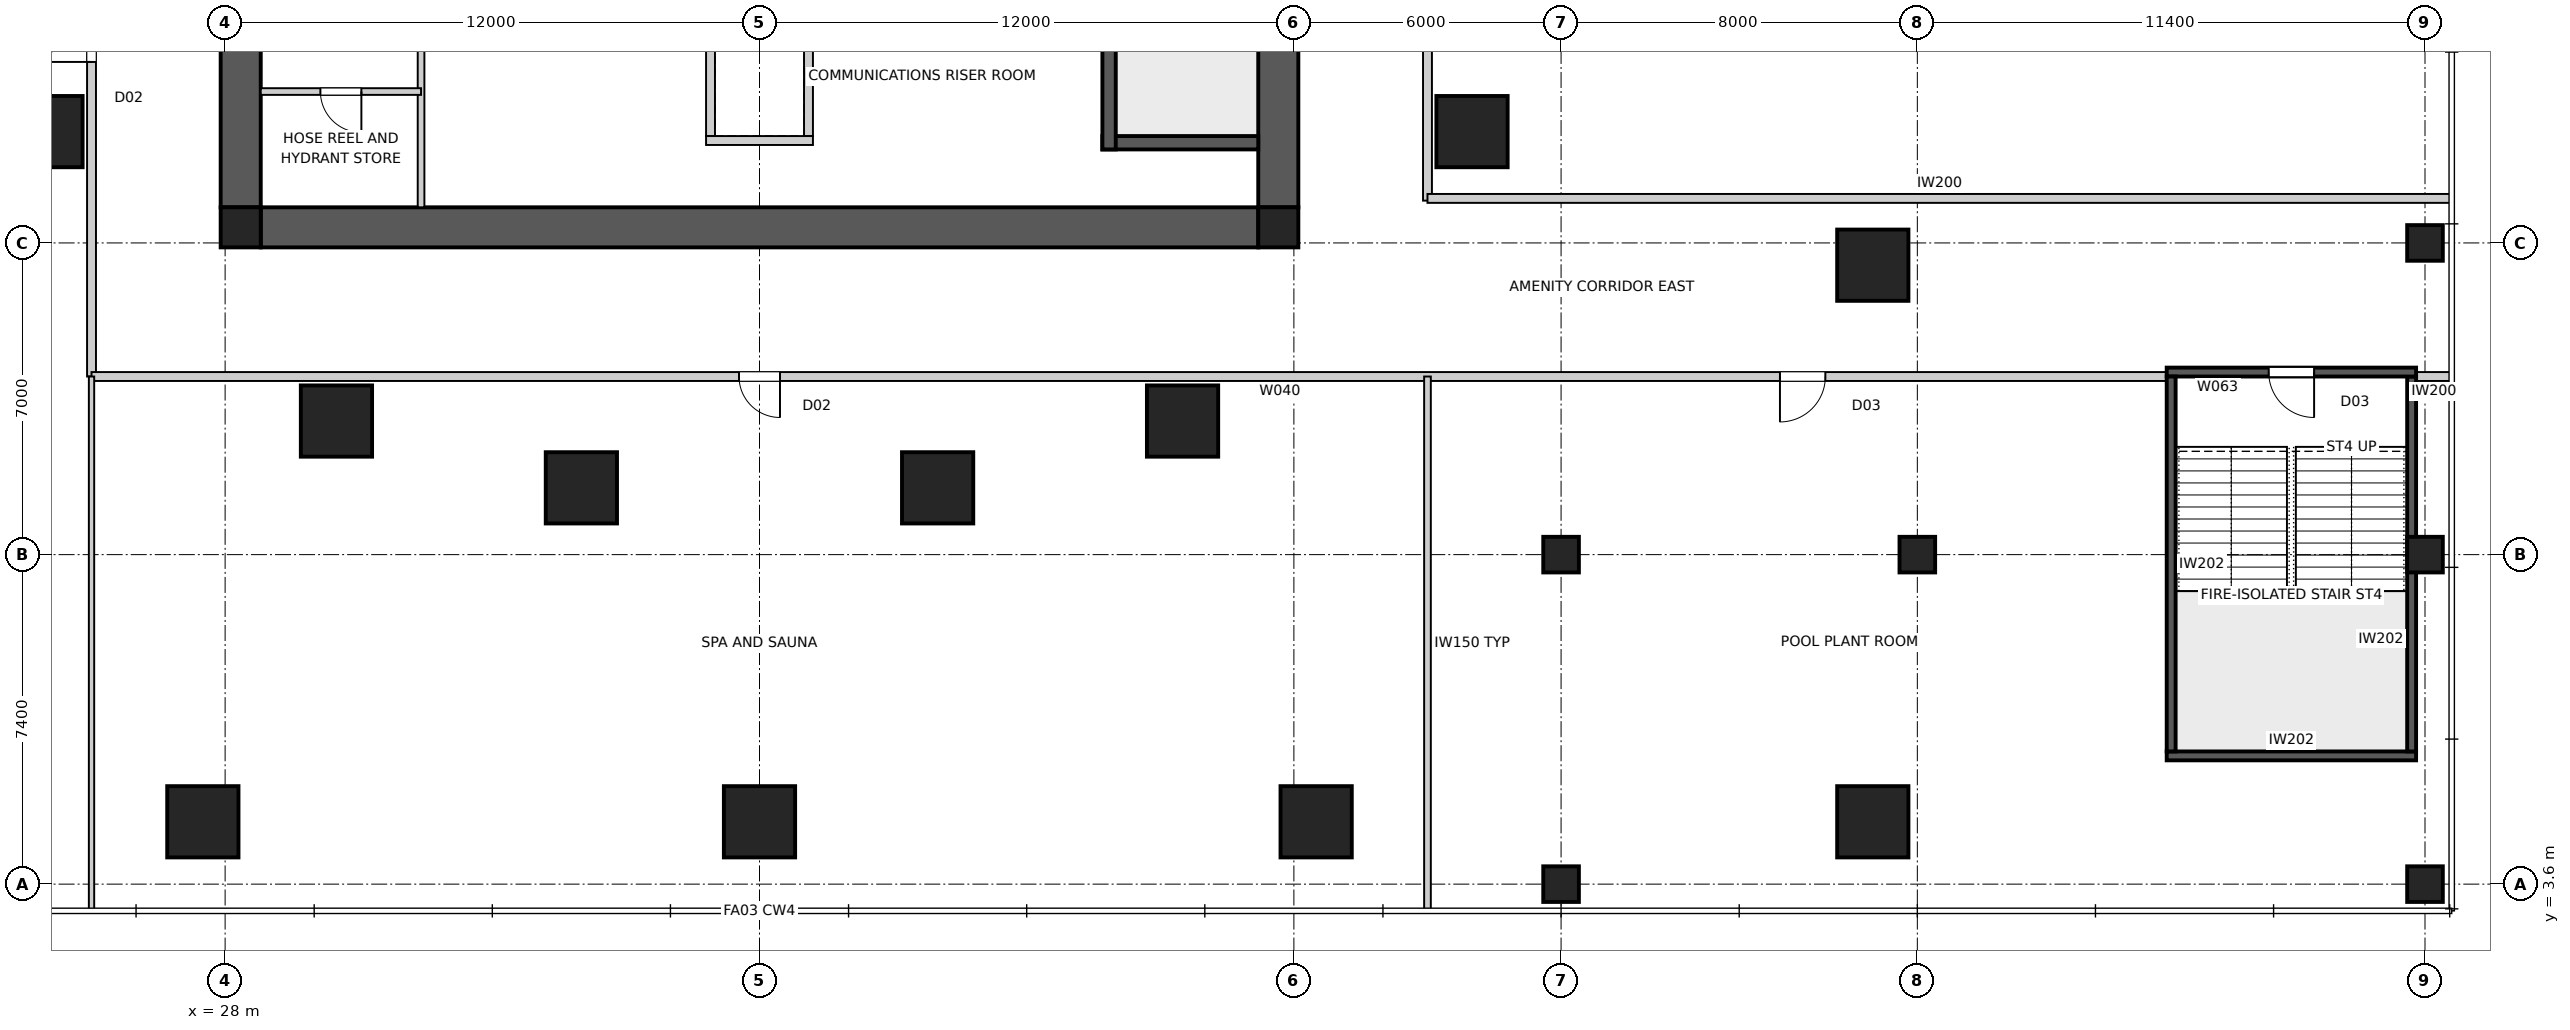
"""IFC4 building model, lengths in metres.
Left out: names, types, materials, properties, quantities, classifications, styles, units other than length and angle.
Written with IfcOpenShell. Run it as: python <this file> out.ifc"""

import sys

from ifc_helpers import new_model, si_unit, direction, frame, frame_2d, origin, origin_2d, place, context, subcontext, project, spatial, polyline, rectangle, outline, extrude, element, fill, save


model = new_model("IFC4")
c1 = context("Model", 3, precision=1e-05, world=origin(), true_north=direction((0.0, 1.0)))
c2 = subcontext(c1, "Body", "Model", "MODEL_VIEW")
j1 = project(units=[si_unit("LENGTHUNIT", "METRE"), si_unit("PLANEANGLEUNIT", "RADIAN")], contexts=[c1])
p1 = place(None, origin())
s1 = spatial("IfcSite", under=j1, at=p1, CompositionType="ELEMENT")
p2 = place(p1, origin())
s2 = spatial("IfcBuilding", under=s1, at=p2, CompositionType="ELEMENT")
p3 = place(p2, frame((0.0, 0.0, 6.0)))
s3 = spatial("IfcBuildingStorey", under=s2, at=p3, CompositionType="ELEMENT", Elevation=6.0)
p4 = place(p3, frame((51.2, 18.35, 0.0), z_axis=(0.0, 0.0, 1.0), x_axis=(-1.0, 0.0, 0.0)))
e1 = element("IfcWall", 1, at=p4, inside=s3, PredefinedType="SHEAR", context=c2, shape_type="SweptSolid", body=[
    extrude(outline(polyline([(0.0, -0.45), (22.4, -0.45), (22.4, -0.025), (22.85, -0.025), (22.85, 0.025), (22.4, 0.025), (22.4, 0.45), (0.0, 0.45), (0.0, 0.025), (-0.45, 0.025), (-0.45, -0.025), (0.0, -0.025), (0.0, -0.45)])), origin(), (0.0, 0.0, 1.0), 4.5),
])
p5 = place(p3, frame((51.65, 18.8, 0.0), z_axis=(0.0, 0.0, 1.0), x_axis=(0.0, 1.0, 0.0)))
e2 = element("IfcWall", 2, at=p5, inside=s3, PredefinedType="SHEAR", context=c2, shape_type="SweptSolid", body=[
    extrude(outline(polyline([(0.0, -0.45), (22.4, -0.45), (22.4, -0.025), (22.85, -0.025), (22.85, 0.025), (22.4, 0.025), (22.4, 0.45), (0.0, 0.45), (0.0, 0.025), (-0.45, 0.025), (-0.45, -0.025), (0.0, -0.025), (0.0, -0.45)])), origin(), (0.0, 0.0, 1.0), 4.5),
])
p6 = place(p5, frame((11.14, 0.0, 0.0)))
e3 = element("IfcOpeningElement", 3, at=p6, cuts=e2, PredefinedType="OPENING", context=c2, shape_type="SweptSolid", body=[
    extrude(rectangle(XDim=1.02, YDim=2.4, at=frame_2d((0.51, 1.2))), frame((0.0, 0.46, 0.0), z_axis=(0.0, -1.0, 0.0), x_axis=(1.0, 0.0, 0.0)), (0.0, 0.0, 1.0), 0.92),
])
p7 = place(p3, frame((28.35, 41.2, 0.0), z_axis=(0.0, 0.0, 1.0), x_axis=(0.0, -1.0, 0.0)))
e4 = element("IfcWall", 4, at=p7, inside=s3, PredefinedType="SHEAR", context=c2, shape_type="SweptSolid", body=[
    extrude(outline(polyline([(0.0, -0.45), (22.4, -0.45), (22.4, -0.025), (22.85, -0.025), (22.85, 0.025), (22.4, 0.025), (22.4, 0.45), (0.0, 0.45), (0.0, 0.025), (-0.45, 0.025), (-0.45, -0.025), (0.0, -0.025), (0.0, -0.45)])), origin(), (0.0, 0.0, 1.0), 4.5),
])
p8 = place(p7, frame((11.14, 0.0, 0.0)))
e5 = element("IfcOpeningElement", 5, at=p8, cuts=e4, PredefinedType="OPENING", context=c2, shape_type="SweptSolid", body=[
    extrude(rectangle(XDim=1.02, YDim=2.4, at=frame_2d((0.51, 1.2))), frame((0.0, 0.46, 0.0), z_axis=(0.0, -1.0, 0.0), x_axis=(1.0, 0.0, 0.0)), (0.0, 0.0, 1.0), 0.92),
])
p9 = place(p3, frame((47.85, 27.8, 0.0), z_axis=(0.0, 0.0, 1.0), x_axis=(0.0, -1.0, 0.0)))
e6 = element("IfcWall", 6, at=p9, inside=s3, PredefinedType="SHEAR", context=c2, shape_type="SweptSolid", body=[
    extrude(rectangle(XDim=7.7, YDim=0.3, at=frame_2d((3.85, 0.0))), origin(), (0.0, 0.0, 1.0), 4.5),
])
p10 = place(p3, frame((51.2, 20.25, 0.0), z_axis=(0.0, 0.0, 1.0), x_axis=(-1.0, 0.0, 0.0)))
e7 = element("IfcWall", 7, at=p10, inside=s3, PredefinedType="SHEAR", context=c2, shape_type="SweptSolid", body=[
    extrude(rectangle(XDim=3.5, YDim=0.3, at=frame_2d((1.75, 0.0))), origin(), (0.0, 0.0, 1.0), 4.5),
])
for number, where, z_axis, x_axis in (
    (8, (38.9, 22.4, 0.0), (0.0, 0.0, 1.0), (0.0, -1.0, 0.0)),
    (9, (41.1, 22.4, 0.0), (0.0, 0.0, 1.0), (0.0, -1.0, 0.0)),
):
    element("IfcWall", number, at=place(p3, frame(where, z_axis=z_axis, x_axis=x_axis)), inside=s3, PredefinedType="SOLIDWALL", context=c2, shape_type="SweptSolid", body=[
        extrude(rectangle(XDim=2.0, YDim=0.2, at=frame_2d((1.0, 0.0))), origin(), (0.0, 0.0, 1.0), 4.5),
    ])
p11 = place(p3, frame((38.8, 20.3, 0.0), z_axis=(0.0, 0.0, 1.0), x_axis=(1.0, 0.0, 0.0)))
e10 = element("IfcWall", 10, at=p11, inside=s3, PredefinedType="SOLIDWALL", context=c2, shape_type="SweptSolid", body=[
    extrude(rectangle(XDim=2.4, YDim=0.2, at=frame_2d((1.2, 0.0))), origin(), (0.0, 0.0, 1.0), 4.5),
])
for number, where, z_axis, x_axis in (
    (11, (28.35, 18.35, 0.0), (0.0, 0.0, 1.0), (1.0, 0.0, 0.0)),
    (12, (51.65, 18.35, 0.0), (0.0, 0.0, 1.0), (1.0, 0.0, 0.0)),
):
    element("IfcColumn", number, at=place(p3, frame(where, z_axis=z_axis, x_axis=x_axis)), inside=s3, PredefinedType="COLUMN", context=c2, shape_type="SweptSolid", body=[
        extrude(rectangle(XDim=0.9, YDim=0.9, at=origin_2d()), origin(), (0.0, 0.0, 1.0), 4.5),
    ])
for number, where, z_axis, x_axis in (
    (13, (27.5, 5.0, 0.0), (0.0, 0.0, 1.0), (1.0, 0.0, 0.0)),
    (14, (40.0, 5.0, 0.0), (0.0, 0.0, 1.0), (1.0, 0.0, 0.0)),
    (15, (52.5, 5.0, 0.0), (0.0, 0.0, 1.0), (1.0, 0.0, 0.0)),
    (16, (65.0, 5.0, 0.0), (0.0, 0.0, 1.0), (1.0, 0.0, 0.0)),
    (17, (65.0, 17.5, 0.0), (0.0, 0.0, 1.0), (1.0, 0.0, 0.0)),
):
    element("IfcColumn", number, at=place(p3, frame(where, z_axis=z_axis, x_axis=x_axis)), inside=s3, PredefinedType="COLUMN", context=c2, shape_type="SweptSolid", body=[
        extrude(rectangle(XDim=1.6, YDim=1.6, at=origin_2d()), origin(), (0.0, 0.0, 1.0), 4.5),
    ])
for number, where, z_axis, x_axis in (
    (18, (58.0, 3.6, 0.0), (0.0, 0.0, 1.0), (1.0, 0.0, 0.0)),
    (19, (58.0, 11.0, 0.0), (0.0, 0.0, 1.0), (1.0, 0.0, 0.0)),
    (20, (66.0, 11.0, 0.0), (0.0, 0.0, 1.0), (1.0, 0.0, 0.0)),
    (21, (77.4, 3.6, 0.0), (0.0, 0.0, 1.0), (1.0, 0.0, 0.0)),
    (22, (77.4, 11.0, 0.0), (0.0, 0.0, 1.0), (1.0, 0.0, 0.0)),
    (23, (77.4, 18.0, 0.0), (0.0, 0.0, 1.0), (1.0, 0.0, 0.0)),
):
    element("IfcColumn", number, at=place(p3, frame(where, z_axis=z_axis, x_axis=x_axis)), inside=s3, PredefinedType="COLUMN", context=c2, shape_type="SweptSolid", body=[
        extrude(rectangle(XDim=0.8, YDim=0.8, at=origin_2d()), origin(), (0.0, 0.0, 1.0), 4.5),
    ])
for number, where, z_axis, x_axis in (
    (24, (24.0, 20.5, 0.0), (0.0, 0.0, 1.0), (1.0, 0.0, 0.0)),
    (25, (30.5, 14.0, 0.0), (0.0, 0.0, 1.0), (1.0, 0.0, 0.0)),
    (26, (36.0, 12.5, 0.0), (0.0, 0.0, 1.0), (1.0, 0.0, 0.0)),
    (27, (44.0, 12.5, 0.0), (0.0, 0.0, 1.0), (1.0, 0.0, 0.0)),
    (28, (49.5, 14.0, 0.0), (0.0, 0.0, 1.0), (1.0, 0.0, 0.0)),
    (29, (56.0, 20.5, 0.0), (0.0, 0.0, 1.0), (1.0, 0.0, 0.0)),
):
    element("IfcColumn", number, at=place(p3, frame(where, z_axis=z_axis, x_axis=x_axis)), inside=s3, PredefinedType="COLUMN", context=c2, shape_type="SweptSolid", body=[
        extrude(rectangle(XDim=1.6, YDim=1.6, at=origin_2d()), origin(), (0.0, 0.0, 1.0), 4.5),
    ])
p12 = place(p3, frame((71.6, 6.48, 0.0), z_axis=(0.0, 0.0, 1.0), x_axis=(1.0, 0.0, 0.0)))
e30 = element("IfcWall", 30, at=p12, inside=s3, PredefinedType="SOLIDWALL", context=c2, shape_type="SweptSolid", body=[
    extrude(rectangle(XDim=5.6, YDim=0.2, at=frame_2d((2.8, 0.0))), origin(), (0.0, 0.0, 1.0), 4.15),
])
p13 = place(p3, frame((77.1, 6.58, 0.0), z_axis=(0.0, 0.0, 1.0), x_axis=(0.0, 1.0, 0.0)))
e31 = element("IfcWall", 31, at=p13, inside=s3, PredefinedType="SOLIDWALL", context=c2, shape_type="SweptSolid", body=[
    extrude(rectangle(XDim=8.42, YDim=0.2, at=frame_2d((4.21, 0.0))), origin(), (0.0, 0.0, 1.0), 4.15),
])
p14 = place(p3, frame((77.2, 15.1, 0.0), z_axis=(0.0, 0.0, 1.0), x_axis=(-1.0, 0.0, 0.0)))
e32 = element("IfcWall", 32, at=p14, inside=s3, PredefinedType="SOLIDWALL", context=c2, shape_type="SweptSolid", body=[
    extrude(rectangle(XDim=5.6, YDim=0.2, at=frame_2d((2.8, 0.0))), origin(), (0.0, 0.0, 1.0), 4.15),
])
p15 = place(p14, frame((2.29, 0.0, 0.0)))
e33 = element("IfcOpeningElement", 33, at=p15, cuts=e32, PredefinedType="OPENING", context=c2, shape_type="SweptSolid", body=[
    extrude(rectangle(XDim=1.02, YDim=2.1, at=frame_2d((0.51, 1.05))), frame((0.0, 0.11, 0.0), z_axis=(0.0, -1.0, 0.0), x_axis=(1.0, 0.0, 0.0)), (0.0, 0.0, 1.0), 0.22),
])
p16 = place(p3, frame((71.7, 15.0, 0.0), z_axis=(0.0, 0.0, 1.0), x_axis=(0.0, -1.0, 0.0)))
e34 = element("IfcWall", 34, at=p16, inside=s3, PredefinedType="SOLIDWALL", context=c2, shape_type="SweptSolid", body=[
    extrude(rectangle(XDim=8.42, YDim=0.2, at=frame_2d((4.21, 0.0))), origin(), (0.0, 0.0, 1.0), 4.15),
])
p17 = place(p3, frame((32.4, 18.8, 0.0), z_axis=(0.0, 0.0, 1.0), x_axis=(0.0, 1.0, 0.0)))
e35 = element("IfcWall", 35, at=p17, inside=s3, PredefinedType="SOLIDWALL", context=c2, shape_type="SweptSolid", body=[
    extrude(rectangle(XDim=5.9, YDim=0.15, at=frame_2d((2.95, 0.0))), origin(), (0.0, 0.0, 1.0), 4.15),
])
p18 = place(p3, frame((32.4, 21.4, 0.0), z_axis=(0.0, 0.0, 1.0), x_axis=(-1.0, 0.0, 0.0)))
e36 = element("IfcWall", 36, at=p18, inside=s3, PredefinedType="SOLIDWALL", context=c2, shape_type="SweptSolid", body=[
    extrude(rectangle(XDim=3.6, YDim=0.15, at=frame_2d((1.8, 0.0))), origin(), (0.0, 0.0, 1.0), 4.15),
])
p19 = place(p18, frame((1.34, 0.0, 0.0)))
e37 = element("IfcOpeningElement", 37, at=p19, cuts=e36, PredefinedType="OPENING", context=c2, shape_type="SweptSolid", body=[
    extrude(rectangle(XDim=0.92, YDim=2.1, at=frame_2d((0.46, 1.05))), frame((0.0, 0.085, 0.0), z_axis=(0.0, -1.0, 0.0), x_axis=(1.0, 0.0, 0.0)), (0.0, 0.0, 1.0), 0.17),
])
p20 = place(p3, frame((25.0, 15.0, 0.0), z_axis=(0.0, 0.0, 1.0), x_axis=(0.0, 1.0, 0.0)))
e38 = element("IfcWall", 38, at=p20, inside=s3, PredefinedType="PARTITIONING", context=c2, shape_type="SweptSolid", body=[
    extrude(rectangle(XDim=26.05, YDim=0.2, at=frame_2d((13.025, 0.0))), origin(), (0.0, 0.0, 1.0), 4.15),
])
p21 = place(p20, frame((7.065, 0.0, 0.0)))
e39 = element("IfcOpeningElement", 39, at=p21, cuts=e38, PredefinedType="OPENING", context=c2, shape_type="SweptSolid", body=[
    extrude(rectangle(XDim=0.92, YDim=2.34, at=frame_2d((0.46, 1.17))), frame((0.0, 0.11, 0.0), z_axis=(0.0, -1.0, 0.0), x_axis=(1.0, 0.0, 0.0)), (0.0, 0.0, 1.0), 0.22),
])
p22 = place(p20, frame((20.04, 0.0, 0.0)))
e40 = element("IfcOpeningElement", 40, at=p22, cuts=e38, PredefinedType="OPENING", context=c2, shape_type="SweptSolid", body=[
    extrude(rectangle(XDim=0.92, YDim=2.34, at=frame_2d((0.46, 1.17))), frame((0.0, 0.11, 0.0), z_axis=(0.0, -1.0, 0.0), x_axis=(1.0, 0.0, 0.0)), (0.0, 0.0, 1.0), 0.22),
])
p23 = place(p3, frame((71.6, 15.0, 0.0), z_axis=(0.0, 0.0, 1.0), x_axis=(-1.0, 0.0, 0.0)))
e41 = element("IfcWall", 41, at=p23, inside=s3, PredefinedType="PARTITIONING", context=c2, shape_type="SweptSolid", body=[
    extrude(rectangle(XDim=46.6, YDim=0.2, at=frame_2d((23.3, 0.0))), origin(), (0.0, 0.0, 1.0), 4.15),
])
p24 = place(p23, frame((31.14, 0.0, 0.0)))
e42 = element("IfcOpeningElement", 42, at=p24, cuts=e41, PredefinedType="OPENING", context=c2, shape_type="SweptSolid", body=[
    extrude(rectangle(XDim=0.92, YDim=2.34, at=frame_2d((0.46, 1.17))), frame((0.0, 0.11, 0.0), z_axis=(0.0, -1.0, 0.0), x_axis=(1.0, 0.0, 0.0)), (0.0, 0.0, 1.0), 0.22),
])
p25 = place(p23, frame((7.665, 0.0, 0.0)))
e43 = element("IfcOpeningElement", 43, at=p25, cuts=e41, PredefinedType="OPENING", context=c2, shape_type="SweptSolid", body=[
    extrude(rectangle(XDim=1.02, YDim=2.1, at=frame_2d((0.51, 1.05))), frame((0.0, 0.11, 0.0), z_axis=(0.0, -1.0, 0.0), x_axis=(1.0, 0.0, 0.0)), (0.0, 0.0, 1.0), 0.22),
])
p26 = place(p3, frame((55.0, 45.0, 0.0), z_axis=(0.0, 0.0, 1.0), x_axis=(0.0, -1.0, 0.0)))
e44 = element("IfcWall", 44, at=p26, inside=s3, PredefinedType="PARTITIONING", context=c2, shape_type="SweptSolid", body=[
    extrude(rectangle(XDim=26.05, YDim=0.2, at=frame_2d((13.025, 0.0))), origin(), (0.0, 0.0, 1.0), 4.15),
])
p27 = place(p26, frame((19.04, 0.0, 0.0)))
e45 = element("IfcOpeningElement", 45, at=p27, cuts=e44, PredefinedType="OPENING", context=c2, shape_type="SweptSolid", body=[
    extrude(rectangle(XDim=0.92, YDim=2.34, at=frame_2d((0.46, 1.17))), frame((0.0, 0.11, 0.0), z_axis=(0.0, -1.0, 0.0), x_axis=(1.0, 0.0, 0.0)), (0.0, 0.0, 1.0), 0.22),
])
p28 = place(p26, frame((6.465, 0.0, 0.0)))
e46 = element("IfcOpeningElement", 46, at=p28, cuts=e44, PredefinedType="OPENING", context=c2, shape_type="SweptSolid", body=[
    extrude(rectangle(XDim=1.02, YDim=2.1, at=frame_2d((0.51, 1.05))), frame((0.0, 0.11, 0.0), z_axis=(0.0, -1.0, 0.0), x_axis=(1.0, 0.0, 0.0)), (0.0, 0.0, 1.0), 0.22),
])
p29 = place(p3, frame((78.0, 15.0, 0.0), z_axis=(0.0, 0.0, 1.0), x_axis=(-1.0, 0.0, 0.0)))
e47 = element("IfcWall", 47, at=p29, inside=s3, PredefinedType="PARTITIONING", context=c2, shape_type="SweptSolid", body=[
    extrude(rectangle(XDim=0.8, YDim=0.2, at=frame_2d((0.4, 0.0))), origin(), (0.0, 0.0, 1.0), 4.15),
])
p30 = place(p3, frame((55.0, 19.0, 0.0), z_axis=(0.0, 0.0, 1.0), x_axis=(1.0, 0.0, 0.0)))
e48 = element("IfcWall", 48, at=p30, inside=s3, PredefinedType="PARTITIONING", context=c2, shape_type="SweptSolid", body=[
    extrude(rectangle(XDim=23.0, YDim=0.2, at=frame_2d((11.5, 0.0))), origin(), (0.0, 0.0, 1.0), 4.15),
])
p31 = place(p3, frame((25.0, 15.0, 0.0), z_axis=(0.0, 0.0, 1.0), x_axis=(0.0, -1.0, 0.0)))
e49 = element("IfcWall", 49, at=p31, inside=s3, PredefinedType="PARTITIONING", context=c2, shape_type="SweptSolid", body=[
    extrude(rectangle(XDim=12.0, YDim=0.12, at=frame_2d((6.0, 0.0))), origin(), (0.0, 0.0, 1.0), 4.15),
])
p32 = place(p3, frame((55.0, 15.0, 0.0), z_axis=(0.0, 0.0, 1.0), x_axis=(0.0, -1.0, 0.0)))
e50 = element("IfcWall", 50, at=p32, inside=s3, PredefinedType="SOLIDWALL", context=c2, shape_type="SweptSolid", body=[
    extrude(rectangle(XDim=12.0, YDim=0.15, at=frame_2d((6.0, 0.0))), origin(), (0.0, 0.0, 1.0), 4.15),
])
p33 = place(p24, origin())
e51 = element("IfcDoor", 51, at=p33, inside=s3, OperationType="SINGLE_SWING_LEFT", PredefinedType="DOOR", context=c2, shape_type="SweptSolid", body=[
    extrude(rectangle(XDim=0.92, YDim=2.34, at=frame_2d((0.46, 1.17))), frame((0.0, 0.025, 0.0), z_axis=(0.0, -1.0, 0.0), x_axis=(1.0, 0.0, 0.0)), (0.0, 0.0, 1.0), 0.05),
])
fill(e42, e51)
p34 = place(p21, origin())
e52 = element("IfcDoor", 52, at=p34, inside=s3, OperationType="SINGLE_SWING_LEFT", PredefinedType="DOOR", context=c2, shape_type="SweptSolid", body=[
    extrude(rectangle(XDim=0.92, YDim=2.34, at=frame_2d((0.46, 1.17))), frame((0.0, 0.025, 0.0), z_axis=(0.0, -1.0, 0.0), x_axis=(1.0, 0.0, 0.0)), (0.0, 0.0, 1.0), 0.05),
])
fill(e39, e52)
p35 = place(p25, origin())
e53 = element("IfcDoor", 53, at=p35, inside=s3, OperationType="SINGLE_SWING_RIGHT", PredefinedType="DOOR", context=c2, shape_type="SweptSolid", body=[
    extrude(rectangle(XDim=1.02, YDim=2.1, at=frame_2d((0.51, 1.05))), frame((0.0, 0.025, 0.0), z_axis=(0.0, -1.0, 0.0), x_axis=(1.0, 0.0, 0.0)), (0.0, 0.0, 1.0), 0.05),
])
fill(e43, e53)
p36 = place(p15, origin())
e54 = element("IfcDoor", 54, at=p36, inside=s3, OperationType="SINGLE_SWING_LEFT", PredefinedType="DOOR", context=c2, shape_type="SweptSolid", body=[
    extrude(rectangle(XDim=1.02, YDim=2.1, at=frame_2d((0.51, 1.05))), frame((0.0, 0.025, 0.0), z_axis=(0.0, -1.0, 0.0), x_axis=(1.0, 0.0, 0.0)), (0.0, 0.0, 1.0), 0.05),
])
fill(e33, e54)
p37 = place(p19, origin())
e55 = element("IfcDoor", 55, at=p37, inside=s3, OperationType="SINGLE_SWING_LEFT", PredefinedType="DOOR", context=c2, shape_type="SweptSolid", body=[
    extrude(rectangle(XDim=0.92, YDim=2.1, at=frame_2d((0.46, 1.05))), frame((0.0, 0.025, 0.0), z_axis=(0.0, -1.0, 0.0), x_axis=(1.0, 0.0, 0.0)), (0.0, 0.0, 1.0), 0.05),
])
fill(e37, e55)
save(model, sys.argv[1])
